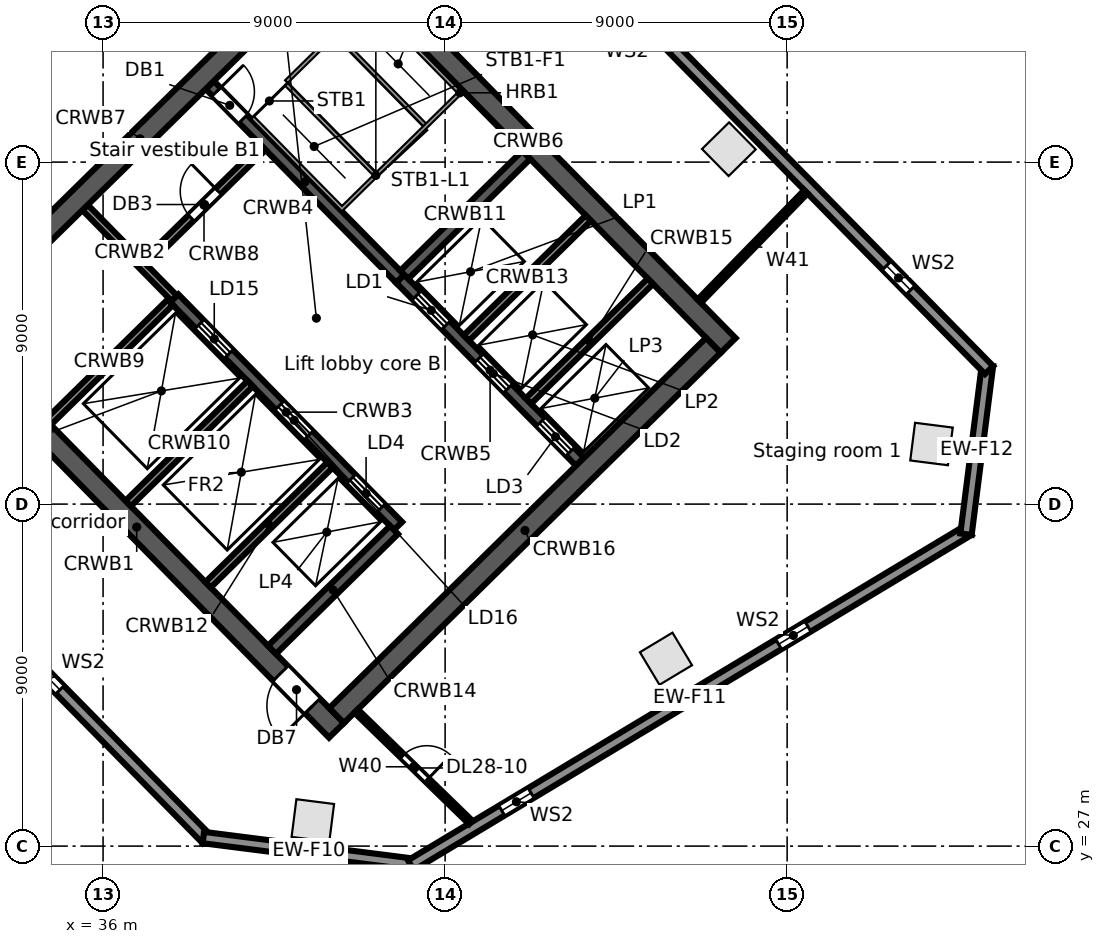
"""IFC4 building model, lengths in metres.
Left out: names, types, materials, properties, quantities, classifications, styles, units other than length and angle.
Written with IfcOpenShell. Run it as: python <this file> out.ifc"""

import sys

from ifc_helpers import new_model, si_unit, direction, frame, frame_2d, origin, origin_2d, place, context, subcontext, project, spatial, rectangle, extrude, element, fill, save


model = new_model("IFC4")
c1 = context("Model", 3, precision=1e-05, world=origin(), true_north=direction((0.0, 1.0)))
c2 = subcontext(c1, "Body", "Model", "MODEL_VIEW")
j1 = project(units=[si_unit("LENGTHUNIT", "METRE"), si_unit("PLANEANGLEUNIT", "RADIAN")], contexts=[c1])
p1 = place(None, origin())
s1 = spatial("IfcSite", under=j1, at=p1, CompositionType="ELEMENT")
p2 = place(p1, origin())
s2 = spatial("IfcBuilding", under=s1, at=p2, CompositionType="ELEMENT")
p3 = place(p2, frame((0.0, 0.0, 145.5)))
s3 = spatial("IfcBuildingStorey", under=s2, at=p3, CompositionType="ELEMENT", Elevation=145.5)
for number, where, z_axis, x_axis in (
    (1, (41.52, 27.675, 0.0), (0.0, 0.0, 1.0), (0.992, -0.126, 0.0)),
    (2, (50.812, 31.931, 0.0), (0.0, 0.0, 1.0), (0.857, 0.515, 0.0)),
    (3, (57.799, 37.581, 0.0), (0.0, 0.0, 1.0), (0.126, 0.992, 0.0)),
    (4, (52.467, 45.339, 0.0), (0.0, 0.0, 1.0), (-0.701, 0.713, 0.0)),
):
    element("IfcColumn", number, at=place(p3, frame(where, z_axis=z_axis, x_axis=x_axis)), inside=s3, PredefinedType="COLUMN", context=c2, shape_type="SweptSolid", body=[
        extrude(rectangle(XDim=1.0, YDim=1.0, at=origin_2d()), origin(), (0.0, 0.0, 1.0), 4.4),
    ])
p4 = place(p3, frame((38.727, 27.181, 0.0), z_axis=(0.0, 0.0, 1.0), x_axis=(-0.700906405975, 0.713253258011, 0.0)))
e5 = element("IfcWall", 5, at=p4, inside=s3, PredefinedType="STANDARD", context=c2, shape_type="SweptSolid", body=[
    extrude(rectangle(XDim=18.923, YDim=0.3, at=frame_2d((9.462, 0.0))), origin(), (0.0, 0.0, 1.0), 4.05),
])
p5 = place(p4, frame((14.967, 0.0, 0.6)))
e6 = element("IfcOpeningElement", 6, at=p5, cuts=e5, PredefinedType="OPENING", context=c2, shape_type="SweptSolid", body=[
    extrude(rectangle(XDim=0.9, YDim=2.8, at=frame_2d((0.45, 1.4))), frame((0.0, 0.16, 0.0), z_axis=(0.0, -1.0, 0.0), x_axis=(1.0, 0.0, 0.0)), (0.0, 0.0, 1.0), 0.32),
])
p6 = place(p4, frame((5.512, 0.0, 0.6)))
e7 = element("IfcOpeningElement", 7, at=p6, cuts=e5, PredefinedType="OPENING", context=c2, shape_type="SweptSolid", body=[
    extrude(rectangle(XDim=0.9, YDim=2.8, at=frame_2d((0.45, 1.4))), frame((0.0, 0.16, 0.0), z_axis=(0.0, -1.0, 0.0), x_axis=(1.0, 0.0, 0.0)), (0.0, 0.0, 1.0), 0.32),
])
p7 = place(p3, frame((44.196, 26.518, 0.0), z_axis=(0.0, 0.0, 1.0), x_axis=(-0.992001881269, 0.126223086474, 0.0)))
e8 = element("IfcWall", 8, at=p7, inside=s3, PredefinedType="STANDARD", context=c2, shape_type="SweptSolid", body=[
    extrude(rectangle(XDim=5.602, YDim=0.3, at=frame_2d((2.801, 0.0))), origin(), (0.0, 0.0, 1.0), 4.05),
])
p8 = place(p3, frame((58.778, 35.318, 0.0), z_axis=(0.0, 0.0, 1.0), x_axis=(-0.857168206138, -0.515036568009, 0.0)))
e9 = element("IfcWall", 9, at=p8, inside=s3, PredefinedType="STANDARD", context=c2, shape_type="SweptSolid", body=[
    extrude(rectangle(XDim=17.125, YDim=0.3, at=frame_2d((8.562, 0.0))), origin(), (0.0, 0.0, 1.0), 4.05),
])
p9 = place(p8, frame((13.435, 0.0, 0.6)))
e10 = element("IfcOpeningElement", 10, at=p9, cuts=e9, PredefinedType="OPENING", context=c2, shape_type="SweptSolid", body=[
    extrude(rectangle(XDim=0.9, YDim=2.8, at=frame_2d((0.45, 1.4))), frame((0.0, 0.16, 0.0), z_axis=(0.0, -1.0, 0.0), x_axis=(1.0, 0.0, 0.0)), (0.0, 0.0, 1.0), 0.32),
])
p10 = place(p8, frame((4.935, 0.0, 0.6)))
e11 = element("IfcOpeningElement", 11, at=p10, cuts=e9, PredefinedType="OPENING", context=c2, shape_type="SweptSolid", body=[
    extrude(rectangle(XDim=0.9, YDim=2.8, at=frame_2d((0.45, 1.4))), frame((0.0, 0.16, 0.0), z_axis=(0.0, -1.0, 0.0), x_axis=(1.0, 0.0, 0.0)), (0.0, 0.0, 1.0), 0.32),
])
p11 = place(p3, frame((59.272, 39.651, 0.0), z_axis=(0.0, 0.0, 1.0), x_axis=(-0.126181137886, -0.992007217938, 0.0)))
e12 = element("IfcWall", 12, at=p11, inside=s3, PredefinedType="STANDARD", context=c2, shape_type="SweptSolid", body=[
    extrude(rectangle(XDim=4.479, YDim=0.3, at=frame_2d((2.24, 0.0))), origin(), (0.0, 0.0, 1.0), 4.05),
])
p12 = place(p3, frame((40.594, 58.577, 0.0), z_axis=(0.0, 0.0, 1.0), x_axis=(0.700909719808, -0.713250001528, 0.0)))
e13 = element("IfcWall", 13, at=p12, inside=s3, PredefinedType="STANDARD", context=c2, shape_type="SweptSolid", body=[
    extrude(rectangle(XDim=26.708, YDim=0.3, at=frame_2d((13.354, 0.0))), origin(), (0.0, 0.0, 1.0), 4.05),
])
p13 = place(p12, frame((22.858, 0.0, 0.6)))
e14 = element("IfcOpeningElement", 14, at=p13, cuts=e13, PredefinedType="OPENING", context=c2, shape_type="SweptSolid", body=[
    extrude(rectangle(XDim=0.9, YDim=2.8, at=frame_2d((0.45, 1.4))), frame((0.0, 0.16, 0.0), z_axis=(0.0, -1.0, 0.0), x_axis=(1.0, 0.0, 0.0)), (0.0, 0.0, 1.0), 0.32),
])
p14 = place(p12, frame((13.987, 0.0, 0.6)))
e15 = element("IfcOpeningElement", 15, at=p14, cuts=e13, PredefinedType="OPENING", context=c2, shape_type="SweptSolid", body=[
    extrude(rectangle(XDim=0.9, YDim=2.8, at=frame_2d((0.45, 1.4))), frame((0.0, 0.16, 0.0), z_axis=(0.0, -1.0, 0.0), x_axis=(1.0, 0.0, 0.0)), (0.0, 0.0, 1.0), 0.32),
])
p15 = place(p12, frame((5.115, 0.0, 0.6)))
e16 = element("IfcOpeningElement", 16, at=p15, cuts=e13, PredefinedType="OPENING", context=c2, shape_type="SweptSolid", body=[
    extrude(rectangle(XDim=0.9, YDim=2.8, at=frame_2d((0.45, 1.4))), frame((0.0, 0.16, 0.0), z_axis=(0.0, -1.0, 0.0), x_axis=(1.0, 0.0, 0.0)), (0.0, 0.0, 1.0), 0.32),
])
p16 = place(p3, frame((31.628, 40.745, 0.0), z_axis=(0.0, 0.0, 1.0), x_axis=(0.700911255944, -0.713248491965, 0.0)))
e17 = element("IfcWall", 17, at=p16, inside=s3, PredefinedType="SOLIDWALL", context=c2, shape_type="SweptSolid", body=[
    extrude(rectangle(XDim=15.0, YDim=0.55, at=frame_2d((7.5, 0.0))), origin(), (0.0, 0.0, 1.0), 4.05),
])
p17 = place(p16, frame((12.9, 0.0, 0.0)))
e18 = element("IfcOpeningElement", 18, at=p17, cuts=e17, PredefinedType="OPENING", context=c2, shape_type="SweptSolid", body=[
    extrude(rectangle(XDim=1.2, YDim=2.1, at=frame_2d((0.6, 1.05))), frame((0.0, 0.285, 0.0), z_axis=(0.0, -1.0, 0.0), x_axis=(1.0, 0.0, 0.0)), (0.0, 0.0, 1.0), 0.57),
])
p18 = place(p3, frame((35.526, 43.805, 0.0), z_axis=(0.0, 0.0, 1.0), x_axis=(0.700884863746, -0.713274426691, 0.0)))
e19 = element("IfcWall", 19, at=p18, inside=s3, PredefinedType="SOLIDWALL", context=c2, shape_type="SweptSolid", body=[
    extrude(rectangle(XDim=3.35, YDim=0.2, at=frame_2d((1.675, 0.0))), origin(), (0.0, 0.0, 1.0), 4.05),
])
p19 = place(p3, frame((37.874, 41.416, 0.0), z_axis=(0.0, 0.0, 1.0), x_axis=(0.700918271237, -0.71324159795, 0.0)))
e20 = element("IfcWall", 20, at=p19, inside=s3, PredefinedType="SOLIDWALL", context=c2, shape_type="SweptSolid", body=[
    extrude(rectangle(XDim=8.4, YDim=0.3, at=frame_2d((4.2, 0.0))), origin(), (0.0, 0.0, 1.0), 4.05),
])
p20 = place(p19, frame((0.95, 0.0, 0.0)))
e21 = element("IfcOpeningElement", 21, at=p20, cuts=e20, PredefinedType="OPENING", context=c2, shape_type="SweptSolid", body=[
    extrude(rectangle(XDim=1.1, YDim=2.1, at=frame_2d((0.55, 1.05))), frame((0.0, 0.16, 0.0), z_axis=(0.0, -1.0, 0.0), x_axis=(1.0, 0.0, 0.0)), (0.0, 0.0, 1.0), 0.32),
])
p21 = place(p19, frame((3.95, 0.0, 0.0)))
e22 = element("IfcOpeningElement", 22, at=p21, cuts=e20, PredefinedType="OPENING", context=c2, shape_type="SweptSolid", body=[
    extrude(rectangle(XDim=1.1, YDim=2.1, at=frame_2d((0.55, 1.05))), frame((0.0, 0.16, 0.0), z_axis=(0.0, -1.0, 0.0), x_axis=(1.0, 0.0, 0.0)), (0.0, 0.0, 1.0), 0.32),
])
p22 = place(p19, frame((6.65, 0.0, 0.0)))
e23 = element("IfcOpeningElement", 23, at=p22, cuts=e20, PredefinedType="OPENING", context=c2, shape_type="SweptSolid", body=[
    extrude(rectangle(XDim=1.1, YDim=2.1, at=frame_2d((0.55, 1.05))), frame((0.0, 0.16, 0.0), z_axis=(0.0, -1.0, 0.0), x_axis=(1.0, 0.0, 0.0)), (0.0, 0.0, 1.0), 0.32),
])
p23 = place(p3, frame((38.807, 47.029, 0.0), z_axis=(0.0, 0.0, 1.0), x_axis=(0.700916852778, -0.713242991898, 0.0)))
e24 = element("IfcWall", 24, at=p23, inside=s3, PredefinedType="SOLIDWALL", context=c2, shape_type="SweptSolid", body=[
    extrude(rectangle(XDim=7.15, YDim=0.3, at=frame_2d((3.575, 0.0))), origin(), (0.0, 0.0, 1.0), 4.05),
])
p24 = place(p23, frame((0.25, 0.0, 0.0)))
e25 = element("IfcOpeningElement", 25, at=p24, cuts=e24, PredefinedType="OPENING", context=c2, shape_type="SweptSolid", body=[
    extrude(rectangle(XDim=1.0, YDim=2.1, at=frame_2d((0.5, 1.05))), frame((0.0, 0.16, 0.0), z_axis=(0.0, -1.0, 0.0), x_axis=(1.0, 0.0, 0.0)), (0.0, 0.0, 1.0), 0.32),
])
p25 = place(p3, frame((43.819, 41.929, 0.0), z_axis=(0.0, 0.0, 1.0), x_axis=(0.700931209592, -0.713228882912, 0.0)))
e26 = element("IfcWall", 26, at=p25, inside=s3, PredefinedType="SOLIDWALL", context=c2, shape_type="SweptSolid", body=[
    extrude(rectangle(XDim=6.75, YDim=0.3, at=frame_2d((3.375, 0.0))), origin(), (0.0, 0.0, 1.0), 4.05),
])
p26 = place(p25, frame((0.615, 0.0, 0.0)))
e27 = element("IfcOpeningElement", 27, at=p26, cuts=e26, PredefinedType="OPENING", context=c2, shape_type="SweptSolid", body=[
    extrude(rectangle(XDim=1.1, YDim=2.1, at=frame_2d((0.55, 1.05))), frame((0.0, 0.16, 0.0), z_axis=(0.0, -1.0, 0.0), x_axis=(1.0, 0.0, 0.0)), (0.0, 0.0, 1.0), 0.32),
])
p27 = place(p25, frame((2.945, 0.0, 0.0)))
e28 = element("IfcOpeningElement", 28, at=p27, cuts=e26, PredefinedType="OPENING", context=c2, shape_type="SweptSolid", body=[
    extrude(rectangle(XDim=1.1, YDim=2.1, at=frame_2d((0.55, 1.05))), frame((0.0, 0.16, 0.0), z_axis=(0.0, -1.0, 0.0), x_axis=(1.0, 0.0, 0.0)), (0.0, 0.0, 1.0), 0.32),
])
p28 = place(p25, frame((5.28, 0.0, 0.0)))
e29 = element("IfcOpeningElement", 29, at=p28, cuts=e26, PredefinedType="OPENING", context=c2, shape_type="SweptSolid", body=[
    extrude(rectangle(XDim=1.1, YDim=2.1, at=frame_2d((0.55, 1.05))), frame((0.0, 0.16, 0.0), z_axis=(0.0, -1.0, 0.0), x_axis=(1.0, 0.0, 0.0)), (0.0, 0.0, 1.0), 0.32),
])
p29 = place(p3, frame((41.934, 50.873, 0.0), z_axis=(0.0, 0.0, 1.0), x_axis=(0.700911255944, -0.713248491965, 0.0)))
e30 = element("IfcWall", 30, at=p29, inside=s3, PredefinedType="SOLIDWALL", context=c2, shape_type="SweptSolid", body=[
    extrude(rectangle(XDim=15.0, YDim=0.55, at=frame_2d((7.5, 0.0))), origin(), (0.0, 0.0, 1.0), 4.05),
])
p30 = place(p3, frame((32.017, 40.742, 0.0), z_axis=(0.0, 0.0, 1.0), x_axis=(0.713253550094, 0.700906108746, 0.0)))
e31 = element("IfcWall", 31, at=p30, inside=s3, PredefinedType="SOLIDWALL", context=c2, shape_type="SweptSolid", body=[
    extrude(rectangle(XDim=13.9, YDim=0.55, at=frame_2d((6.95, 0.0))), origin(), (0.0, 0.0, 1.0), 4.05),
])
p31 = place(p3, frame((37.104, 42.342, 0.0), z_axis=(0.0, 0.0, 1.0), x_axis=(0.713281298468, 0.700877870428, 0.0)))
e32 = element("IfcWall", 32, at=p31, inside=s3, PredefinedType="PARTITIONING", context=c2, shape_type="SweptSolid", body=[
    extrude(rectangle(XDim=4.35, YDim=0.2, at=frame_2d((2.175, 0.0))), origin(), (0.0, 0.0, 1.0), 4.05),
])
p32 = place(p31, frame((1.7, 0.0, 0.0)))
e33 = element("IfcOpeningElement", 33, at=p32, cuts=e32, PredefinedType="OPENING", context=c2, shape_type="SweptSolid", body=[
    extrude(rectangle(XDim=1.0, YDim=2.1, at=frame_2d((0.5, 1.05))), frame((0.0, 0.11, 0.0), z_axis=(0.0, -1.0, 0.0), x_axis=(1.0, 0.0, 0.0)), (0.0, 0.0, 1.0), 0.22),
])
p33 = place(p3, frame((34.558, 38.156, 0.0), z_axis=(0.0, 0.0, 1.0), x_axis=(0.713237924006, 0.700922009755, 0.0)))
e34 = element("IfcWall", 34, at=p33, inside=s3, PredefinedType="SOLIDWALL", context=c2, shape_type="SweptSolid", body=[
    extrude(rectangle(XDim=4.5, YDim=0.2, at=frame_2d((2.25, 0.0))), origin(), (0.0, 0.0, 1.0), 4.05),
])
p34 = place(p3, frame((36.66, 36.017, 0.0), z_axis=(0.0, 0.0, 1.0), x_axis=(0.713264577552, 0.700894886848, 0.0)))
e35 = element("IfcWall", 35, at=p34, inside=s3, PredefinedType="SOLIDWALL", context=c2, shape_type="SweptSolid", body=[
    extrude(rectangle(XDim=4.5, YDim=0.2, at=frame_2d((2.25, 0.0))), origin(), (0.0, 0.0, 1.0), 4.05),
])
p35 = place(p3, frame((43.926, 42.034, 0.0), z_axis=(0.0, 0.0, 1.0), x_axis=(0.713210801054, 0.700949608217, 0.0)))
e36 = element("IfcWall", 36, at=p35, inside=s3, PredefinedType="SOLIDWALL", context=c2, shape_type="SweptSolid", body=[
    extrude(rectangle(XDim=4.5, YDim=0.3, at=frame_2d((2.25, 0.0))), origin(), (0.0, 0.0, 1.0), 4.05),
])
p36 = place(p3, frame((38.763, 33.877, 0.0), z_axis=(0.0, 0.0, 1.0), x_axis=(0.713237455685, 0.700922486305, 0.0)))
e37 = element("IfcWall", 37, at=p36, inside=s3, PredefinedType="SOLIDWALL", context=c2, shape_type="SweptSolid", body=[
    extrude(rectangle(XDim=4.5, YDim=0.2, at=frame_2d((2.25, 0.0))), origin(), (0.0, 0.0, 1.0), 4.05),
])
p37 = place(p3, frame((45.559, 40.373, 0.0), z_axis=(0.0, 0.0, 1.0), x_axis=(0.713264577552, 0.700894886848, 0.0)))
e38 = element("IfcWall", 38, at=p37, inside=s3, PredefinedType="SOLIDWALL", context=c2, shape_type="SweptSolid", body=[
    extrude(rectangle(XDim=4.5, YDim=0.2, at=frame_2d((2.25, 0.0))), origin(), (0.0, 0.0, 1.0), 4.05),
])
p38 = place(p3, frame((40.445, 32.165, 0.0), z_axis=(0.0, 0.0, 1.0), x_axis=(0.713264577552, 0.700894886848, 0.0)))
e39 = element("IfcWall", 39, at=p38, inside=s3, PredefinedType="SOLIDWALL", context=c2, shape_type="SweptSolid", body=[
    extrude(rectangle(XDim=4.5, YDim=0.3, at=frame_2d((2.25, 0.0))), origin(), (0.0, 0.0, 1.0), 4.05),
])
p39 = place(p3, frame((47.192, 38.711, 0.0), z_axis=(0.0, 0.0, 1.0), x_axis=(0.713264577552, 0.700894886848, 0.0)))
e40 = element("IfcWall", 40, at=p39, inside=s3, PredefinedType="SOLIDWALL", context=c2, shape_type="SweptSolid", body=[
    extrude(rectangle(XDim=4.5, YDim=0.2, at=frame_2d((2.25, 0.0))), origin(), (0.0, 0.0, 1.0), 4.05),
])
p40 = place(p3, frame((42.145, 30.435, 0.0), z_axis=(0.0, 0.0, 1.0), x_axis=(0.713253550094, 0.700906108746, 0.0)))
e41 = element("IfcWall", 41, at=p40, inside=s3, PredefinedType="SOLIDWALL", context=c2, shape_type="SweptSolid", body=[
    extrude(rectangle(XDim=13.9, YDim=0.55, at=frame_2d((6.95, 0.0))), origin(), (0.0, 0.0, 1.0), 4.05),
])
p41 = place(p3, frame((42.659, 30.555, 0.0), z_axis=(0.0, 0.0, 1.0), x_axis=(0.716925671772, -0.697149611743, 0.0)))
e42 = element("IfcWall", 42, at=p41, inside=s3, PredefinedType="PARTITIONING", context=c2, shape_type="SweptSolid", body=[
    extrude(rectangle(XDim=4.21, YDim=0.125, at=frame_2d((2.105, 0.0))), origin(), (0.0, 0.0, 1.0), 3.23),
])
p42 = place(p41, frame((1.7, 0.0, 0.0)))
e43 = element("IfcOpeningElement", 43, at=p42, cuts=e42, PredefinedType="OPENING", context=c2, shape_type="SweptSolid", body=[
    extrude(rectangle(XDim=0.9, YDim=2.1, at=frame_2d((0.45, 1.05))), frame((0.0, 0.073, 0.0), z_axis=(0.0, -1.0, 0.0), x_axis=(1.0, 0.0, 0.0)), (0.0, 0.0, 1.0), 0.145),
])
p43 = place(p3, frame((51.688, 41.34, 0.0), z_axis=(0.0, 0.0, 1.0), x_axis=(0.698090794369, 0.716009247718, 0.0)))
e44 = element("IfcWall", 44, at=p43, inside=s3, PredefinedType="PARTITIONING", context=c2, shape_type="SweptSolid", body=[
    extrude(rectangle(XDim=4.019, YDim=0.125, at=frame_2d((2.01, 0.0))), origin(), (0.0, 0.0, 1.0), 3.23),
])
p44 = place(p6, origin())
e45 = element("IfcWindow", 45, at=p44, inside=s3, PartitioningType="SINGLE_PANEL", PredefinedType="WINDOW", context=c2, shape_type="SweptSolid", body=[
    extrude(rectangle(XDim=0.9, YDim=2.8, at=frame_2d((0.45, 1.4))), frame((0.0, 0.03, 0.0), z_axis=(0.0, -1.0, 0.0), x_axis=(1.0, 0.0, 0.0)), (0.0, 0.0, 1.0), 0.06),
])
fill(e7, e45)
p45 = place(p9, origin())
e46 = element("IfcWindow", 46, at=p45, inside=s3, PartitioningType="SINGLE_PANEL", PredefinedType="WINDOW", context=c2, shape_type="SweptSolid", body=[
    extrude(rectangle(XDim=0.9, YDim=2.8, at=frame_2d((0.45, 1.4))), frame((0.0, 0.03, 0.0), z_axis=(0.0, -1.0, 0.0), x_axis=(1.0, 0.0, 0.0)), (0.0, 0.0, 1.0), 0.06),
])
fill(e10, e46)
p46 = place(p10, origin())
e47 = element("IfcWindow", 47, at=p46, inside=s3, PartitioningType="SINGLE_PANEL", PredefinedType="WINDOW", context=c2, shape_type="SweptSolid", body=[
    extrude(rectangle(XDim=0.9, YDim=2.8, at=frame_2d((0.45, 1.4))), frame((0.0, 0.03, 0.0), z_axis=(0.0, -1.0, 0.0), x_axis=(1.0, 0.0, 0.0)), (0.0, 0.0, 1.0), 0.06),
])
fill(e11, e47)
p47 = place(p13, origin())
e48 = element("IfcWindow", 48, at=p47, inside=s3, PartitioningType="SINGLE_PANEL", PredefinedType="WINDOW", context=c2, shape_type="SweptSolid", body=[
    extrude(rectangle(XDim=0.9, YDim=2.8, at=frame_2d((0.45, 1.4))), frame((0.0, 0.03, 0.0), z_axis=(0.0, -1.0, 0.0), x_axis=(1.0, 0.0, 0.0)), (0.0, 0.0, 1.0), 0.06),
])
fill(e14, e48)
p48 = place(p26, origin())
e49 = element("IfcDoor", 49, at=p48, inside=s3, OperationType="DOUBLE_DOOR_SLIDING", PredefinedType="DOOR", context=c2, shape_type="SweptSolid", body=[
    extrude(rectangle(XDim=1.1, YDim=2.1, at=frame_2d((0.55, 1.05))), frame((0.0, 0.025, 0.0), z_axis=(0.0, -1.0, 0.0), x_axis=(1.0, 0.0, 0.0)), (0.0, 0.0, 1.0), 0.05),
])
fill(e27, e49)
p49 = place(p27, origin())
e50 = element("IfcDoor", 50, at=p49, inside=s3, OperationType="DOUBLE_DOOR_SLIDING", PredefinedType="DOOR", context=c2, shape_type="SweptSolid", body=[
    extrude(rectangle(XDim=1.1, YDim=2.1, at=frame_2d((0.55, 1.05))), frame((0.0, 0.025, 0.0), z_axis=(0.0, -1.0, 0.0), x_axis=(1.0, 0.0, 0.0)), (0.0, 0.0, 1.0), 0.05),
])
fill(e28, e50)
p50 = place(p28, origin())
e51 = element("IfcDoor", 51, at=p50, inside=s3, OperationType="DOUBLE_DOOR_SLIDING", PredefinedType="DOOR", context=c2, shape_type="SweptSolid", body=[
    extrude(rectangle(XDim=1.1, YDim=2.1, at=frame_2d((0.55, 1.05))), frame((0.0, 0.025, 0.0), z_axis=(0.0, -1.0, 0.0), x_axis=(1.0, 0.0, 0.0)), (0.0, 0.0, 1.0), 0.05),
])
fill(e29, e51)
p51 = place(p20, origin())
e52 = element("IfcDoor", 52, at=p51, inside=s3, OperationType="DOUBLE_DOOR_SLIDING", PredefinedType="DOOR", context=c2, shape_type="SweptSolid", body=[
    extrude(rectangle(XDim=1.1, YDim=2.1, at=frame_2d((0.55, 1.05))), frame((0.0, 0.025, 0.0), z_axis=(0.0, -1.0, 0.0), x_axis=(1.0, 0.0, 0.0)), (0.0, 0.0, 1.0), 0.05),
])
fill(e21, e52)
p52 = place(p21, origin())
e53 = element("IfcDoor", 53, at=p52, inside=s3, OperationType="DOUBLE_DOOR_SLIDING", PredefinedType="DOOR", context=c2, shape_type="SweptSolid", body=[
    extrude(rectangle(XDim=1.1, YDim=2.1, at=frame_2d((0.55, 1.05))), frame((0.0, 0.025, 0.0), z_axis=(0.0, -1.0, 0.0), x_axis=(1.0, 0.0, 0.0)), (0.0, 0.0, 1.0), 0.05),
])
fill(e22, e53)
p53 = place(p22, origin())
e54 = element("IfcDoor", 54, at=p53, inside=s3, OperationType="DOUBLE_DOOR_SLIDING", PredefinedType="DOOR", context=c2, shape_type="SweptSolid", body=[
    extrude(rectangle(XDim=1.1, YDim=2.1, at=frame_2d((0.55, 1.05))), frame((0.0, 0.025, 0.0), z_axis=(0.0, -1.0, 0.0), x_axis=(1.0, 0.0, 0.0)), (0.0, 0.0, 1.0), 0.05),
])
fill(e23, e54)
p54 = place(p24, origin())
e55 = element("IfcDoor", 55, at=p54, inside=s3, OperationType="SINGLE_SWING_LEFT", PredefinedType="DOOR", context=c2, shape_type="SweptSolid", body=[
    extrude(rectangle(XDim=1.0, YDim=2.1, at=frame_2d((0.5, 1.05))), frame((0.0, 0.025, 0.0), z_axis=(0.0, -1.0, 0.0), x_axis=(1.0, 0.0, 0.0)), (0.0, 0.0, 1.0), 0.05),
])
fill(e25, e55)
p55 = place(p32, origin())
e56 = element("IfcDoor", 56, at=p55, inside=s3, OperationType="SINGLE_SWING_RIGHT", PredefinedType="DOOR", context=c2, shape_type="SweptSolid", body=[
    extrude(rectangle(XDim=1.0, YDim=2.1, at=frame_2d((0.5, 1.05))), frame((0.0, 0.025, 0.0), z_axis=(0.0, -1.0, 0.0), x_axis=(1.0, 0.0, 0.0)), (0.0, 0.0, 1.0), 0.05),
])
fill(e33, e56)
p56 = place(p17, frame((1.2, 0.0, 0.0), z_axis=(0.0, 0.0, 1.0), x_axis=(-1.0, 0.0, 0.0)))
e57 = element("IfcDoor", 57, at=p56, inside=s3, OperationType="SINGLE_SWING_LEFT", PredefinedType="DOOR", context=c2, shape_type="SweptSolid", body=[
    extrude(rectangle(XDim=1.2, YDim=2.1, at=frame_2d((0.6, 1.05))), frame((0.0, 0.025, 0.0), z_axis=(0.0, -1.0, 0.0), x_axis=(1.0, 0.0, 0.0)), (0.0, 0.0, 1.0), 0.05),
])
fill(e18, e57)
p57 = place(p42, origin())
e58 = element("IfcDoor", 58, at=p57, inside=s3, OperationType="SINGLE_SWING_RIGHT", PredefinedType="DOOR", context=c2, shape_type="SweptSolid", body=[
    extrude(rectangle(XDim=0.9, YDim=2.1, at=frame_2d((0.45, 1.05))), frame((0.0, 0.025, 0.0), z_axis=(0.0, -1.0, 0.0), x_axis=(1.0, 0.0, 0.0)), (0.0, 0.0, 1.0), 0.05),
])
fill(e43, e58)
save(model, sys.argv[1])
